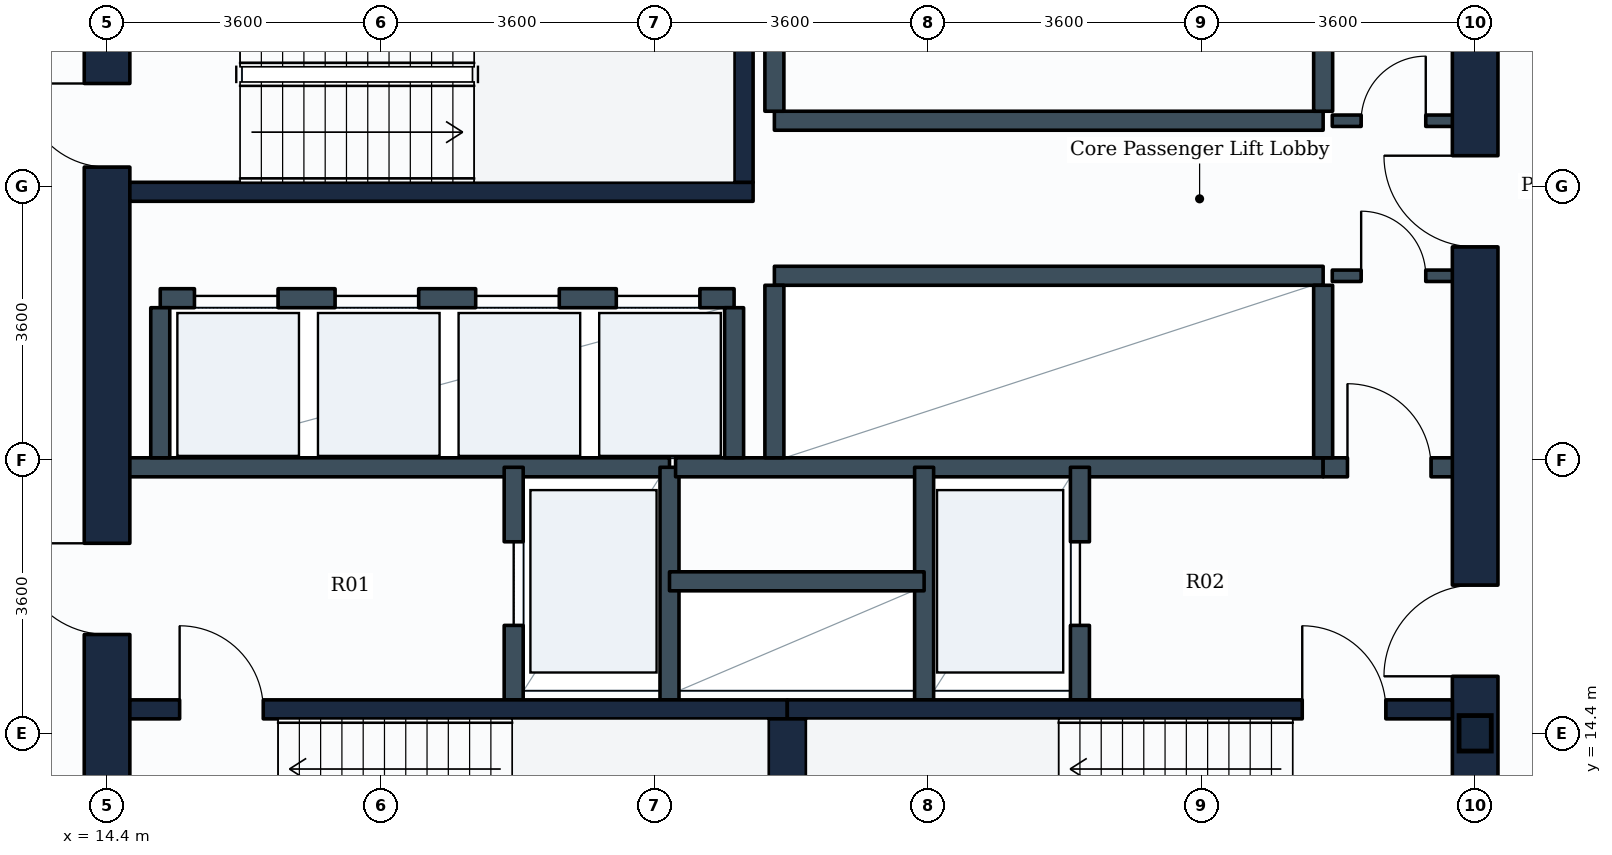
"""IFC4 building model, lengths in metres.
Left out: names, types, materials, properties, quantities, classifications, styles, units other than length and angle.
Written with IfcOpenShell. Run it as: python <this file> out.ifc"""

import sys

from ifc_helpers import new_model, si_unit, direction, frame, frame_2d, origin, origin_2d, place, context, subcontext, project, spatial, rectangle, i_section, extrude, element, fill, save


model = new_model("IFC4")
c1 = context("Model", 3, precision=1e-05, world=origin(), true_north=direction((0.0, 1.0)))
c2 = subcontext(c1, "Body", "Model", "MODEL_VIEW")
j1 = project(units=[si_unit("LENGTHUNIT", "METRE"), si_unit("PLANEANGLEUNIT", "RADIAN")], contexts=[c1])
p1 = place(None, origin())
s1 = spatial("IfcSite", under=j1, at=p1, CompositionType="ELEMENT")
p2 = place(p1, origin())
s2 = spatial("IfcBuilding", under=s1, at=p2, CompositionType="ELEMENT")
p3 = place(p2, frame((0.0, 0.0, 80.1)))
s3 = spatial("IfcBuildingStorey", under=s2, at=p3, CompositionType="ELEMENT", Elevation=80.1)
p4 = place(p3, frame((32.4, 14.4, 0.0), z_axis=(0.0, 0.0, 1.0), x_axis=(1.0, 0.0, 0.0)))
e1 = element("IfcColumn", 1, at=p4, inside=s3, PredefinedType="COLUMN", context=c2, shape_type="SweptSolid", body=[
    extrude(i_section(OverallWidth=0.424, OverallDepth=0.467, WebThickness=0.033, FlangeThickness=0.053, FilletRadius=0.015, at=origin_2d()), origin(), (0.0, 0.0, 1.0), 3.9),
])
p5 = place(p3, frame((14.4, 10.8, 0.0), z_axis=(0.0, 0.0, 1.0), x_axis=(0.0, 1.0, 0.0)))
e2 = element("IfcWall", 2, at=p5, inside=s3, PredefinedType="SHEAR", context=c2, shape_type="SweptSolid", body=[
    extrude(rectangle(XDim=14.4, YDim=0.6, at=frame_2d((7.2, 0.0))), origin(), (0.0, 0.0, 1.0), 3.65),
])
p6 = place(p5, frame((11.05, 0.0, 0.0)))
e3 = element("IfcOpeningElement", 3, at=p6, cuts=e2, PredefinedType="OPENING", context=c2, shape_type="SweptSolid", body=[
    extrude(rectangle(XDim=1.1, YDim=2.1, at=frame_2d((0.55, 1.05))), frame((0.0, 0.31, 0.0), z_axis=(0.0, -1.0, 0.0), x_axis=(1.0, 0.0, 0.0)), (0.0, 0.0, 1.0), 0.62),
])
p7 = place(p5, frame((4.9, 0.0, 0.0)))
e4 = element("IfcOpeningElement", 4, at=p7, cuts=e2, PredefinedType="OPENING", context=c2, shape_type="SweptSolid", body=[
    extrude(rectangle(XDim=1.2, YDim=2.1, at=frame_2d((0.6, 1.05))), frame((0.0, 0.31, 0.0), z_axis=(0.0, -1.0, 0.0), x_axis=(1.0, 0.0, 0.0)), (0.0, 0.0, 1.0), 0.62),
])
p8 = place(p3, frame((32.4, 10.8, 0.0), z_axis=(0.0, 0.0, 1.0), x_axis=(0.0, 1.0, 0.0)))
e5 = element("IfcWall", 5, at=p8, inside=s3, PredefinedType="SHEAR", context=c2, shape_type="SweptSolid", body=[
    extrude(rectangle(XDim=14.4, YDim=0.6, at=frame_2d((7.2, 0.0))), origin(), (0.0, 0.0, 1.0), 3.65),
])
p9 = place(p8, frame((4.35, 0.0, 0.0)))
e6 = element("IfcOpeningElement", 6, at=p9, cuts=e5, PredefinedType="OPENING", context=c2, shape_type="SweptSolid", body=[
    extrude(rectangle(XDim=1.2, YDim=2.1, at=frame_2d((0.6, 1.05))), frame((0.0, 0.31, 0.0), z_axis=(0.0, -1.0, 0.0), x_axis=(1.0, 0.0, 0.0)), (0.0, 0.0, 1.0), 0.62),
])
p10 = place(p8, frame((10.0, 0.0, 0.0)))
e7 = element("IfcOpeningElement", 7, at=p10, cuts=e5, PredefinedType="OPENING", context=c2, shape_type="SweptSolid", body=[
    extrude(rectangle(XDim=1.2, YDim=2.1, at=frame_2d((0.6, 1.05))), frame((0.0, 0.31, 0.0), z_axis=(0.0, -1.0, 0.0), x_axis=(1.0, 0.0, 0.0)), (0.0, 0.0, 1.0), 0.62),
])
p11 = place(p3, frame((14.7, 14.715, 0.0), z_axis=(0.0, 0.0, 1.0), x_axis=(1.0, 0.0, 0.0)))
e8 = element("IfcWall", 8, at=p11, inside=s3, PredefinedType="SHEAR", context=c2, shape_type="SweptSolid", body=[
    extrude(rectangle(XDim=8.65, YDim=0.25, at=frame_2d((4.325, 0.0))), origin(), (0.0, 0.0, 1.0), 3.65),
])
p12 = place(p11, frame((0.655, 0.0, 0.0)))
e9 = element("IfcOpeningElement", 9, at=p12, cuts=e8, PredefinedType="OPENING", context=c2, shape_type="SweptSolid", body=[
    extrude(rectangle(XDim=1.1, YDim=2.1, at=frame_2d((0.55, 1.05))), frame((0.0, 0.135, 0.0), z_axis=(0.0, -1.0, 0.0), x_axis=(1.0, 0.0, 0.0)), (0.0, 0.0, 1.0), 0.27),
])
p13 = place(p3, frame((23.35, 14.715, 0.0), z_axis=(0.0, 0.0, 1.0), x_axis=(1.0, 0.0, 0.0)))
e10 = element("IfcWall", 10, at=p13, inside=s3, PredefinedType="SHEAR", context=c2, shape_type="SweptSolid", body=[
    extrude(rectangle(XDim=8.75, YDim=0.25, at=frame_2d((4.375, 0.0))), origin(), (0.0, 0.0, 1.0), 3.65),
])
p14 = place(p13, frame((6.775, 0.0, 0.0)))
e11 = element("IfcOpeningElement", 11, at=p14, cuts=e10, PredefinedType="OPENING", context=c2, shape_type="SweptSolid", body=[
    extrude(rectangle(XDim=1.1, YDim=2.1, at=frame_2d((0.55, 1.05))), frame((0.0, 0.135, 0.0), z_axis=(0.0, -1.0, 0.0), x_axis=(1.0, 0.0, 0.0)), (0.0, 0.0, 1.0), 0.27),
])
p15 = place(p3, frame((23.35, 11.75, 0.0), z_axis=(0.0, 0.0, 1.0), x_axis=(0.0, 1.0, 0.0)))
e12 = element("IfcWall", 12, at=p15, inside=s3, PredefinedType="SHEAR", context=c2, shape_type="SweptSolid", body=[
    extrude(rectangle(XDim=2.84, YDim=0.5, at=frame_2d((1.42, 0.0))), origin(), (0.0, 0.0, 1.0), 3.65),
])
p16 = place(p3, frame((14.7, 21.525, 0.0), z_axis=(0.0, 0.0, 1.0), x_axis=(1.0, 0.0, 0.0)))
e13 = element("IfcWall", 13, at=p16, inside=s3, PredefinedType="SHEAR", context=c2, shape_type="SweptSolid", body=[
    extrude(rectangle(XDim=8.2, YDim=0.25, at=frame_2d((4.1, 0.0))), origin(), (0.0, 0.0, 1.0), 3.65),
])
p17 = place(p3, frame((22.775, 21.65, 0.0), z_axis=(0.0, 0.0, 1.0), x_axis=(0.0, 1.0, 0.0)))
e14 = element("IfcWall", 14, at=p17, inside=s3, PredefinedType="SHEAR", context=c2, shape_type="SweptSolid", body=[
    extrude(rectangle(XDim=2.84, YDim=0.25, at=frame_2d((1.42, 0.0))), origin(), (0.0, 0.0, 1.0), 3.65),
])
p18 = place(p3, frame((14.65, 17.9, 0.0), z_axis=(0.0, 0.0, 1.0), x_axis=(1.0, 0.0, 0.0)))
e15 = element("IfcWall", 15, at=p18, inside=s3, PredefinedType="PARTITIONING", context=c2, shape_type="SweptSolid", body=[
    extrude(rectangle(XDim=7.15, YDim=0.25, at=frame_2d((3.575, 0.0))), origin(), (0.0, 0.0, 1.0), 3.635),
])
p19 = place(p3, frame((19.75, 14.84, 0.0), z_axis=(0.0, 0.0, 1.0), x_axis=(0.0, 1.0, 0.0)))
e16 = element("IfcWall", 16, at=p19, inside=s3, PredefinedType="PARTITIONING", context=c2, shape_type="SweptSolid", body=[
    extrude(rectangle(XDim=3.06, YDim=0.25, at=frame_2d((1.53, 0.0))), origin(), (0.0, 0.0, 1.0), 3.635),
])
p20 = place(p19, frame((0.98, 0.0, 0.0)))
e17 = element("IfcOpeningElement", 17, at=p20, cuts=e16, PredefinedType="OPENING", context=c2, shape_type="SweptSolid", body=[
    extrude(rectangle(XDim=1.1, YDim=2.1, at=frame_2d((0.55, 1.05))), frame((0.0, 0.135, 0.0), z_axis=(0.0, -1.0, 0.0), x_axis=(1.0, 0.0, 0.0)), (0.0, 0.0, 1.0), 0.27),
])
p21 = place(p3, frame((21.8, 14.84, 0.0), z_axis=(0.0, 0.0, 1.0), x_axis=(0.0, 1.0, 0.0)))
e18 = element("IfcWall", 18, at=p21, inside=s3, PredefinedType="PARTITIONING", context=c2, shape_type="SweptSolid", body=[
    extrude(rectangle(XDim=3.06, YDim=0.25, at=frame_2d((1.53, 0.0))), origin(), (0.0, 0.0, 1.0), 3.635),
])
p22 = place(p3, frame((21.88, 17.9, 0.0), z_axis=(0.0, 0.0, 1.0), x_axis=(1.0, 0.0, 0.0)))
e19 = element("IfcWall", 19, at=p22, inside=s3, PredefinedType="PARTITIONING", context=c2, shape_type="SweptSolid", body=[
    extrude(rectangle(XDim=8.52, YDim=0.25, at=frame_2d((4.26, 0.0))), origin(), (0.0, 0.0, 1.0), 3.635),
])
p23 = place(p3, frame((30.4, 17.9, 0.0), z_axis=(0.0, 0.0, 1.0), x_axis=(1.0, 0.0, 0.0)))
e20 = element("IfcWall", 20, at=p23, inside=s3, PredefinedType="PARTITIONING", context=c2, shape_type="SweptSolid", body=[
    extrude(rectangle(XDim=1.75, YDim=0.25, at=frame_2d((0.875, 0.0))), origin(), (0.0, 0.0, 1.0), 3.635),
])
p24 = place(p23, frame((0.32, 0.0, 0.0)))
e21 = element("IfcOpeningElement", 21, at=p24, cuts=e20, PredefinedType="OPENING", context=c2, shape_type="SweptSolid", body=[
    extrude(rectangle(XDim=1.1, YDim=2.1, at=frame_2d((0.55, 1.05))), frame((0.0, 0.135, 0.0), z_axis=(0.0, -1.0, 0.0), x_axis=(1.0, 0.0, 0.0)), (0.0, 0.0, 1.0), 0.27),
])
p25 = place(p3, frame((25.15, 14.84, 0.0), z_axis=(0.0, 0.0, 1.0), x_axis=(0.0, 1.0, 0.0)))
e22 = element("IfcWall", 22, at=p25, inside=s3, PredefinedType="PARTITIONING", context=c2, shape_type="SweptSolid", body=[
    extrude(rectangle(XDim=3.06, YDim=0.25, at=frame_2d((1.53, 0.0))), origin(), (0.0, 0.0, 1.0), 3.635),
])
p26 = place(p3, frame((27.2, 14.84, 0.0), z_axis=(0.0, 0.0, 1.0), x_axis=(0.0, 1.0, 0.0)))
e23 = element("IfcWall", 23, at=p26, inside=s3, PredefinedType="PARTITIONING", context=c2, shape_type="SweptSolid", body=[
    extrude(rectangle(XDim=3.06, YDim=0.25, at=frame_2d((1.53, 0.0))), origin(), (0.0, 0.0, 1.0), 3.635),
])
p27 = place(p26, frame((0.98, 0.0, 0.0)))
e24 = element("IfcOpeningElement", 24, at=p27, cuts=e23, PredefinedType="OPENING", context=c2, shape_type="SweptSolid", body=[
    extrude(rectangle(XDim=1.1, YDim=2.1, at=frame_2d((0.55, 1.05))), frame((0.0, 0.135, 0.0), z_axis=(0.0, -1.0, 0.0), x_axis=(1.0, 0.0, 0.0)), (0.0, 0.0, 1.0), 0.27),
])
p28 = place(p3, frame((21.8, 16.4, 0.0), z_axis=(0.0, 0.0, 1.0), x_axis=(1.0, 0.0, 0.0)))
e25 = element("IfcWall", 25, at=p28, inside=s3, PredefinedType="PARTITIONING", context=c2, shape_type="SweptSolid", body=[
    extrude(rectangle(XDim=3.35, YDim=0.25, at=frame_2d((1.675, 0.0))), origin(), (0.0, 0.0, 1.0), 3.635),
])
p29 = place(p3, frame((15.1, 20.125, 0.0), z_axis=(0.0, 0.0, 1.0), x_axis=(1.0, 0.0, 0.0)))
e26 = element("IfcWall", 26, at=p29, inside=s3, PredefinedType="PARTITIONING", context=c2, shape_type="SweptSolid", body=[
    extrude(rectangle(XDim=7.55, YDim=0.25, at=frame_2d((3.775, 0.0))), origin(), (0.0, 0.0, 1.0), 3.635),
])
p30 = place(p29, frame((0.45, 0.0, 0.0)))
e27 = element("IfcOpeningElement", 27, at=p30, cuts=e26, PredefinedType="OPENING", context=c2, shape_type="SweptSolid", body=[
    extrude(rectangle(XDim=1.1, YDim=2.1, at=frame_2d((0.55, 1.05))), frame((0.0, 0.135, 0.0), z_axis=(0.0, -1.0, 0.0), x_axis=(1.0, 0.0, 0.0)), (0.0, 0.0, 1.0), 0.27),
])
p31 = place(p29, frame((2.3, 0.0, 0.0)))
e28 = element("IfcOpeningElement", 28, at=p31, cuts=e26, PredefinedType="OPENING", context=c2, shape_type="SweptSolid", body=[
    extrude(rectangle(XDim=1.1, YDim=2.1, at=frame_2d((0.55, 1.05))), frame((0.0, 0.135, 0.0), z_axis=(0.0, -1.0, 0.0), x_axis=(1.0, 0.0, 0.0)), (0.0, 0.0, 1.0), 0.27),
])
p32 = place(p29, frame((4.15, 0.0, 0.0)))
e29 = element("IfcOpeningElement", 29, at=p32, cuts=e26, PredefinedType="OPENING", context=c2, shape_type="SweptSolid", body=[
    extrude(rectangle(XDim=1.1, YDim=2.1, at=frame_2d((0.55, 1.05))), frame((0.0, 0.135, 0.0), z_axis=(0.0, -1.0, 0.0), x_axis=(1.0, 0.0, 0.0)), (0.0, 0.0, 1.0), 0.27),
])
p33 = place(p29, frame((6.0, 0.0, 0.0)))
e30 = element("IfcOpeningElement", 30, at=p33, cuts=e26, PredefinedType="OPENING", context=c2, shape_type="SweptSolid", body=[
    extrude(rectangle(XDim=1.1, YDim=2.1, at=frame_2d((0.55, 1.05))), frame((0.0, 0.135, 0.0), z_axis=(0.0, -1.0, 0.0), x_axis=(1.0, 0.0, 0.0)), (0.0, 0.0, 1.0), 0.27),
])
for number, where, z_axis, x_axis in (
    (31, (15.1, 18.025, 0.0), (0.0, 0.0, 1.0), (0.0, 1.0, 0.0)),
    (32, (22.65, 18.025, 0.0), (0.0, 0.0, 1.0), (0.0, 1.0, 0.0)),
):
    element("IfcWall", number, at=place(p3, frame(where, z_axis=z_axis, x_axis=x_axis)), inside=s3, PredefinedType="PARTITIONING", context=c2, shape_type="SweptSolid", body=[
        extrude(rectangle(XDim=1.975, YDim=0.25, at=frame_2d((0.988, 0.0))), origin(), (0.0, 0.0, 1.0), 3.635),
    ])
p34 = place(p3, frame((23.18, 20.42, 0.0), z_axis=(0.0, 0.0, 1.0), x_axis=(1.0, 0.0, 0.0)))
e33 = element("IfcWall", 33, at=p34, inside=s3, PredefinedType="PARTITIONING", context=c2, shape_type="SweptSolid", body=[
    extrude(rectangle(XDim=7.22, YDim=0.25, at=frame_2d((3.61, 0.0))), origin(), (0.0, 0.0, 1.0), 3.635),
])
for number, where, z_axis, x_axis in (
    (34, (23.18, 18.025, 0.0), (0.0, 0.0, 1.0), (0.0, 1.0, 0.0)),
    (35, (30.4, 18.025, 0.0), (0.0, 0.0, 1.0), (0.0, 1.0, 0.0)),
):
    element("IfcWall", number, at=place(p3, frame(where, z_axis=z_axis, x_axis=x_axis)), inside=s3, PredefinedType="PARTITIONING", context=c2, shape_type="SweptSolid", body=[
        extrude(rectangle(XDim=2.27, YDim=0.25, at=frame_2d((1.135, 0.0))), origin(), (0.0, 0.0, 1.0), 3.635),
    ])
p35 = place(p3, frame((23.18, 22.46, 0.0), z_axis=(0.0, 0.0, 1.0), x_axis=(1.0, 0.0, 0.0)))
e36 = element("IfcWall", 36, at=p35, inside=s3, PredefinedType="PARTITIONING", context=c2, shape_type="SweptSolid", body=[
    extrude(rectangle(XDim=7.22, YDim=0.25, at=frame_2d((3.61, 0.0))), origin(), (0.0, 0.0, 1.0), 3.635),
])
for number, where, z_axis, x_axis in (
    (37, (23.18, 22.585, 0.0), (0.0, 0.0, 1.0), (0.0, 1.0, 0.0)),
    (38, (30.4, 22.585, 0.0), (0.0, 0.0, 1.0), (0.0, 1.0, 0.0)),
):
    element("IfcWall", number, at=place(p3, frame(where, z_axis=z_axis, x_axis=x_axis)), inside=s3, PredefinedType="PARTITIONING", context=c2, shape_type="SweptSolid", body=[
        extrude(rectangle(XDim=2.315, YDim=0.25, at=frame_2d((1.157, 0.0))), origin(), (0.0, 0.0, 1.0), 3.635),
    ])
p36 = place(p3, frame((30.52, 22.46, 0.0), z_axis=(0.0, 0.0, 1.0), x_axis=(1.0, 0.0, 0.0)))
e39 = element("IfcWall", 39, at=p36, inside=s3, PredefinedType="PARTITIONING", context=c2, shape_type="SweptSolid", body=[
    extrude(rectangle(XDim=1.63, YDim=0.15, at=frame_2d((0.815, 0.0))), origin(), (0.0, 0.0, 1.0), 3.635),
])
p37 = place(p36, frame((0.38, 0.0, 0.0)))
e40 = element("IfcOpeningElement", 40, at=p37, cuts=e39, PredefinedType="OPENING", context=c2, shape_type="SweptSolid", body=[
    extrude(rectangle(XDim=0.85, YDim=2.1, at=frame_2d((0.425, 1.05))), frame((0.0, 0.085, 0.0), z_axis=(0.0, -1.0, 0.0), x_axis=(1.0, 0.0, 0.0)), (0.0, 0.0, 1.0), 0.17),
])
p38 = place(p3, frame((30.52, 20.42, 0.0), z_axis=(0.0, 0.0, 1.0), x_axis=(1.0, 0.0, 0.0)))
e41 = element("IfcWall", 41, at=p38, inside=s3, PredefinedType="PARTITIONING", context=c2, shape_type="SweptSolid", body=[
    extrude(rectangle(XDim=1.63, YDim=0.15, at=frame_2d((0.815, 0.0))), origin(), (0.0, 0.0, 1.0), 3.635),
])
p39 = place(p38, frame((0.38, 0.0, 0.0)))
e42 = element("IfcOpeningElement", 42, at=p39, cuts=e41, PredefinedType="OPENING", context=c2, shape_type="SweptSolid", body=[
    extrude(rectangle(XDim=0.85, YDim=2.1, at=frame_2d((0.425, 1.05))), frame((0.0, 0.085, 0.0), z_axis=(0.0, -1.0, 0.0), x_axis=(1.0, 0.0, 0.0)), (0.0, 0.0, 1.0), 0.17),
])
p40 = place(p12, origin())
e43 = element("IfcDoor", 43, at=p40, inside=s3, OperationType="SINGLE_SWING_LEFT", PredefinedType="DOOR", context=c2, shape_type="SweptSolid", body=[
    extrude(rectangle(XDim=1.1, YDim=2.1, at=frame_2d((0.55, 1.05))), frame((0.0, 0.025, 0.0), z_axis=(0.0, -1.0, 0.0), x_axis=(1.0, 0.0, 0.0)), (0.0, 0.0, 1.0), 0.05),
])
fill(e9, e43)
p41 = place(p14, origin())
e44 = element("IfcDoor", 44, at=p41, inside=s3, OperationType="SINGLE_SWING_LEFT", PredefinedType="DOOR", context=c2, shape_type="SweptSolid", body=[
    extrude(rectangle(XDim=1.1, YDim=2.1, at=frame_2d((0.55, 1.05))), frame((0.0, 0.025, 0.0), z_axis=(0.0, -1.0, 0.0), x_axis=(1.0, 0.0, 0.0)), (0.0, 0.0, 1.0), 0.05),
])
fill(e11, e44)
p42 = place(p6, origin())
e45 = element("IfcDoor", 45, at=p42, inside=s3, OperationType="SINGLE_SWING_RIGHT", PredefinedType="DOOR", context=c2, shape_type="SweptSolid", body=[
    extrude(rectangle(XDim=1.1, YDim=2.1, at=frame_2d((0.55, 1.05))), frame((0.0, 0.025, 0.0), z_axis=(0.0, -1.0, 0.0), x_axis=(1.0, 0.0, 0.0)), (0.0, 0.0, 1.0), 0.05),
])
fill(e3, e45)
p43 = place(p20, origin())
e46 = element("IfcDoor", 46, at=p43, inside=s3, OperationType="SLIDING_TO_LEFT", PredefinedType="DOOR", context=c2, shape_type="SweptSolid", body=[
    extrude(rectangle(XDim=1.1, YDim=2.1, at=frame_2d((0.55, 1.05))), frame((0.0, 0.025, 0.0), z_axis=(0.0, -1.0, 0.0), x_axis=(1.0, 0.0, 0.0)), (0.0, 0.0, 1.0), 0.05),
])
fill(e17, e46)
p44 = place(p27, origin())
e47 = element("IfcDoor", 47, at=p44, inside=s3, OperationType="SLIDING_TO_LEFT", PredefinedType="DOOR", context=c2, shape_type="SweptSolid", body=[
    extrude(rectangle(XDim=1.1, YDim=2.1, at=frame_2d((0.55, 1.05))), frame((0.0, 0.025, 0.0), z_axis=(0.0, -1.0, 0.0), x_axis=(1.0, 0.0, 0.0)), (0.0, 0.0, 1.0), 0.05),
])
fill(e24, e47)
p45 = place(p7, origin())
e48 = element("IfcDoor", 48, at=p45, inside=s3, OperationType="SINGLE_SWING_RIGHT", PredefinedType="DOOR", context=c2, shape_type="SweptSolid", body=[
    extrude(rectangle(XDim=1.2, YDim=2.1, at=frame_2d((0.6, 1.05))), frame((0.0, 0.025, 0.0), z_axis=(0.0, -1.0, 0.0), x_axis=(1.0, 0.0, 0.0)), (0.0, 0.0, 1.0), 0.05),
])
fill(e4, e48)
p46 = place(p9, origin())
e49 = element("IfcDoor", 49, at=p46, inside=s3, OperationType="SINGLE_SWING_LEFT", PredefinedType="DOOR", context=c2, shape_type="SweptSolid", body=[
    extrude(rectangle(XDim=1.2, YDim=2.1, at=frame_2d((0.6, 1.05))), frame((0.0, 0.025, 0.0), z_axis=(0.0, -1.0, 0.0), x_axis=(1.0, 0.0, 0.0)), (0.0, 0.0, 1.0), 0.05),
])
fill(e6, e49)
p47 = place(p24, origin())
e50 = element("IfcDoor", 50, at=p47, inside=s3, OperationType="SINGLE_SWING_LEFT", PredefinedType="DOOR", context=c2, shape_type="SweptSolid", body=[
    extrude(rectangle(XDim=1.1, YDim=2.1, at=frame_2d((0.55, 1.05))), frame((0.0, 0.025, 0.0), z_axis=(0.0, -1.0, 0.0), x_axis=(1.0, 0.0, 0.0)), (0.0, 0.0, 1.0), 0.05),
])
fill(e21, e50)
p48 = place(p30, origin())
e51 = element("IfcDoor", 51, at=p48, inside=s3, OperationType="SLIDING_TO_LEFT", PredefinedType="DOOR", context=c2, shape_type="SweptSolid", body=[
    extrude(rectangle(XDim=1.1, YDim=2.1, at=frame_2d((0.55, 1.05))), frame((0.0, 0.025, 0.0), z_axis=(0.0, -1.0, 0.0), x_axis=(1.0, 0.0, 0.0)), (0.0, 0.0, 1.0), 0.05),
])
fill(e27, e51)
p49 = place(p31, origin())
e52 = element("IfcDoor", 52, at=p49, inside=s3, OperationType="SLIDING_TO_LEFT", PredefinedType="DOOR", context=c2, shape_type="SweptSolid", body=[
    extrude(rectangle(XDim=1.1, YDim=2.1, at=frame_2d((0.55, 1.05))), frame((0.0, 0.025, 0.0), z_axis=(0.0, -1.0, 0.0), x_axis=(1.0, 0.0, 0.0)), (0.0, 0.0, 1.0), 0.05),
])
fill(e28, e52)
p50 = place(p32, origin())
e53 = element("IfcDoor", 53, at=p50, inside=s3, OperationType="SLIDING_TO_LEFT", PredefinedType="DOOR", context=c2, shape_type="SweptSolid", body=[
    extrude(rectangle(XDim=1.1, YDim=2.1, at=frame_2d((0.55, 1.05))), frame((0.0, 0.025, 0.0), z_axis=(0.0, -1.0, 0.0), x_axis=(1.0, 0.0, 0.0)), (0.0, 0.0, 1.0), 0.05),
])
fill(e29, e53)
p51 = place(p33, origin())
e54 = element("IfcDoor", 54, at=p51, inside=s3, OperationType="SLIDING_TO_LEFT", PredefinedType="DOOR", context=c2, shape_type="SweptSolid", body=[
    extrude(rectangle(XDim=1.1, YDim=2.1, at=frame_2d((0.55, 1.05))), frame((0.0, 0.025, 0.0), z_axis=(0.0, -1.0, 0.0), x_axis=(1.0, 0.0, 0.0)), (0.0, 0.0, 1.0), 0.05),
])
fill(e30, e54)
p52 = place(p10, origin())
e55 = element("IfcDoor", 55, at=p52, inside=s3, OperationType="SINGLE_SWING_RIGHT", PredefinedType="DOOR", context=c2, shape_type="SweptSolid", body=[
    extrude(rectangle(XDim=1.2, YDim=2.1, at=frame_2d((0.6, 1.05))), frame((0.0, 0.025, 0.0), z_axis=(0.0, -1.0, 0.0), x_axis=(1.0, 0.0, 0.0)), (0.0, 0.0, 1.0), 0.05),
])
fill(e7, e55)
p53 = place(p37, origin())
e56 = element("IfcDoor", 56, at=p53, inside=s3, OperationType="SINGLE_SWING_RIGHT", PredefinedType="DOOR", context=c2, shape_type="SweptSolid", body=[
    extrude(rectangle(XDim=0.85, YDim=2.1, at=frame_2d((0.425, 1.05))), frame((0.0, 0.025, 0.0), z_axis=(0.0, -1.0, 0.0), x_axis=(1.0, 0.0, 0.0)), (0.0, 0.0, 1.0), 0.05),
])
fill(e40, e56)
p54 = place(p39, origin())
e57 = element("IfcDoor", 57, at=p54, inside=s3, OperationType="SINGLE_SWING_LEFT", PredefinedType="DOOR", context=c2, shape_type="SweptSolid", body=[
    extrude(rectangle(XDim=0.85, YDim=2.1, at=frame_2d((0.425, 1.05))), frame((0.0, 0.025, 0.0), z_axis=(0.0, -1.0, 0.0), x_axis=(1.0, 0.0, 0.0)), (0.0, 0.0, 1.0), 0.05),
])
fill(e42, e57)
save(model, sys.argv[1])
